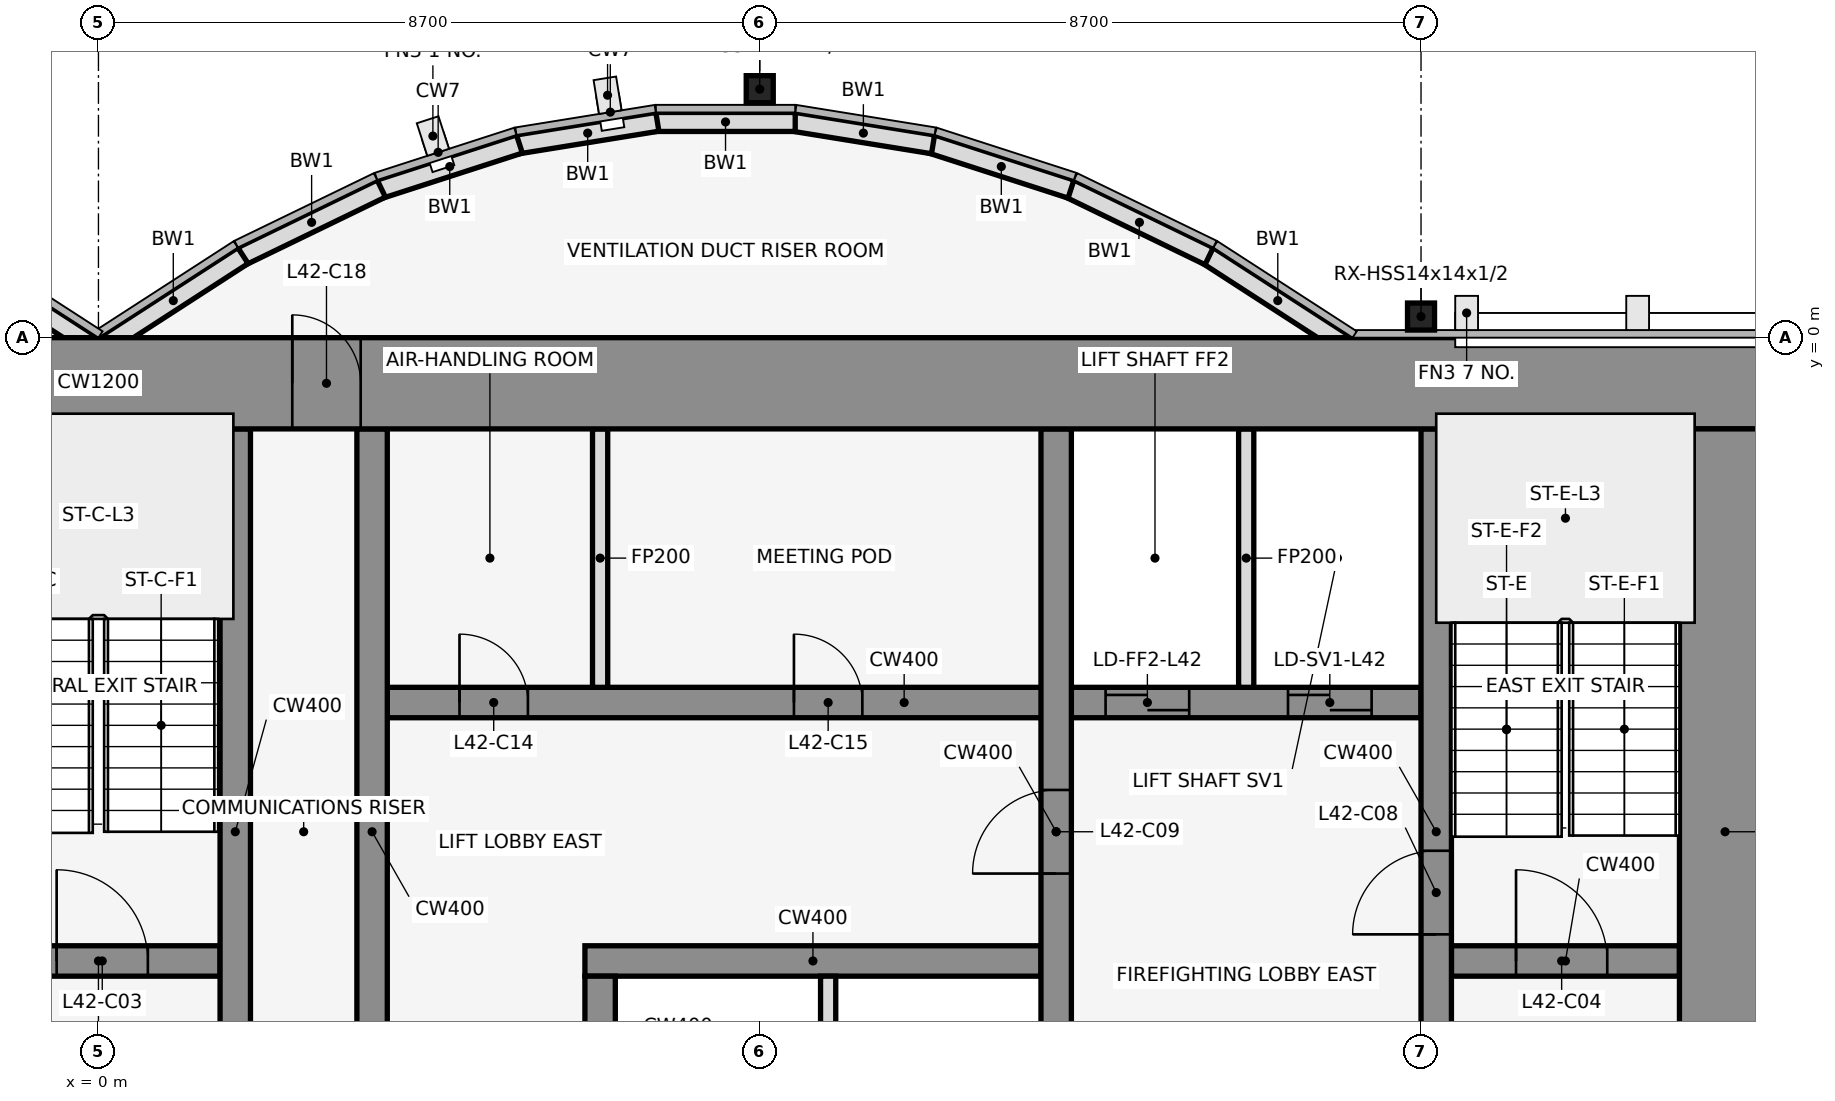
"""IFC4 building model, lengths in metres.
Left out: names, types, materials, properties, quantities, classifications, styles, units other than length and angle.
Written with IfcOpenShell. Run it as: python <this file> out.ifc"""

import sys

from ifc_helpers import new_model, si_unit, direction, frame, frame_2d, origin, origin_2d, place, context, subcontext, project, spatial, rectangle, hollow_rectangle, extrude, element, fill, save


model = new_model("IFC4")
c1 = context("Model", 3, precision=1e-05, world=origin(), true_north=direction((0.0, 1.0)))
c2 = subcontext(c1, "Body", "Model", "MODEL_VIEW")
j1 = project(units=[si_unit("LENGTHUNIT", "METRE"), si_unit("PLANEANGLEUNIT", "RADIAN")], contexts=[c1])
p1 = place(None, origin())
s1 = spatial("IfcSite", under=j1, at=p1, CompositionType="ELEMENT")
p2 = place(p1, origin())
s2 = spatial("IfcBuilding", under=s1, at=p2, CompositionType="ELEMENT")
p3 = place(p2, frame((0.0, 0.0, 190.9)))
s3 = spatial("IfcBuildingStorey", under=s2, at=p3, CompositionType="ELEMENT", Elevation=190.9)
for number, where, z_axis, x_axis in (
    (1, (8.7, 3.269, 0.0), (0.0, 0.0, 1.0), (1.0, 0.0, 0.0)),
    (2, (17.4, 0.278, 0.0), (0.0, 0.0, 1.0), (1.0, 0.0, 0.0)),
):
    element("IfcColumn", number, at=place(p3, frame(where, z_axis=z_axis, x_axis=x_axis)), inside=s3, PredefinedType="COLUMN", context=c2, shape_type="SweptSolid", body=[
        extrude(hollow_rectangle(XDim=0.356, YDim=0.356, WallThickness=0.012, at=origin_2d()), origin(), (0.0, 0.0, 1.0), 4.1),
    ])
p4 = place(p3, frame((16.432, -0.105, 0.0), z_axis=(0.0, 0.0, 1.0), x_axis=(-0.83981312244, 0.542875602121, 0.0)))
e3 = element("IfcWall", 3, at=p4, inside=s3, PredefinedType="STANDARD", context=c2, shape_type="SweptSolid", body=[
    extrude(rectangle(XDim=2.183, YDim=0.25, at=frame_2d((1.091, 0.0))), origin(), (0.0, 0.0, 1.0), 3.95),
])
p5 = place(p3, frame((14.612, 1.073, 0.0), z_axis=(0.0, 0.0, 1.0), x_axis=(-0.89982408427, 0.436252928206, 0.0)))
e4 = element("IfcWall", 4, at=p5, inside=s3, PredefinedType="STANDARD", context=c2, shape_type="SweptSolid", body=[
    extrude(rectangle(XDim=2.038, YDim=0.25, at=frame_2d((1.019, 0.0))), origin(), (0.0, 0.0, 1.0), 3.95),
])
p6 = place(p3, frame((12.795, 1.955, 0.0), z_axis=(0.0, 0.0, 1.0), x_axis=(-0.951495806175, 0.307661714928, 0.0)))
e5 = element("IfcWall", 5, at=p6, inside=s3, PredefinedType="STANDARD", context=c2, shape_type="SweptSolid", body=[
    extrude(rectangle(XDim=1.927, YDim=0.25, at=frame_2d((0.963, 0.0))), origin(), (0.0, 0.0, 1.0), 3.95),
])
p7 = place(p3, frame((10.98, 2.543, 0.0), z_axis=(0.0, 0.0, 1.0), x_axis=(-0.987181718931, 0.159600293885, 0.0)))
e6 = element("IfcWall", 6, at=p7, inside=s3, PredefinedType="STANDARD", context=c2, shape_type="SweptSolid", body=[
    extrude(rectangle(XDim=1.857, YDim=0.25, at=frame_2d((0.929, 0.0))), origin(), (0.0, 0.0, 1.0), 3.95),
])
p8 = place(p3, frame((9.167, 2.838, 0.0), z_axis=(0.0, 0.0, 1.0), x_axis=(-1.0, 0.0, 0.0)))
e7 = element("IfcWall", 7, at=p8, inside=s3, PredefinedType="STANDARD", context=c2, shape_type="SweptSolid", body=[
    extrude(rectangle(XDim=1.833, YDim=0.25, at=frame_2d((0.917, 0.0))), origin(), (0.0, 0.0, 1.0), 3.95),
])
p9 = place(p3, frame((7.353, 2.84, 0.0), z_axis=(0.0, 0.0, 1.0), x_axis=(-0.987181718931, -0.159600293885, 0.0)))
e8 = element("IfcWall", 8, at=p9, inside=s3, PredefinedType="STANDARD", context=c2, shape_type="SweptSolid", body=[
    extrude(rectangle(XDim=1.857, YDim=0.25, at=frame_2d((0.929, 0.0))), origin(), (0.0, 0.0, 1.0), 3.95),
])
p10 = place(p3, frame((5.538, 2.548, 0.0), z_axis=(0.0, 0.0, 1.0), x_axis=(-0.951495806175, -0.307661714928, 0.0)))
e9 = element("IfcWall", 9, at=p10, inside=s3, PredefinedType="STANDARD", context=c2, shape_type="SweptSolid", body=[
    extrude(rectangle(XDim=1.927, YDim=0.25, at=frame_2d((0.963, 0.0))), origin(), (0.0, 0.0, 1.0), 3.95),
])
p11 = place(p3, frame((3.721, 1.962, 0.0), z_axis=(0.0, 0.0, 1.0), x_axis=(-0.89982408427, -0.436252928206, 0.0)))
e10 = element("IfcWall", 10, at=p11, inside=s3, PredefinedType="STANDARD", context=c2, shape_type="SweptSolid", body=[
    extrude(rectangle(XDim=2.038, YDim=0.25, at=frame_2d((1.019, 0.0))), origin(), (0.0, 0.0, 1.0), 3.95),
])
for number, where, z_axis, x_axis in (
    (11, (1.901, 1.08, 0.0), (0.0, 0.0, 1.0), (-0.84, -0.543, 0.0)),
    (12, (-0.068, -0.105, 0.0), (0.0, 0.0, 1.0), (-0.84, 0.543, 0.0)),
):
    element("IfcWall", number, at=place(p3, frame(where, z_axis=z_axis, x_axis=x_axis)), inside=s3, PredefinedType="STANDARD", context=c2, shape_type="SweptSolid", body=[
        extrude(rectangle(XDim=2.183, YDim=0.25, at=frame_2d((1.091, 0.0))), origin(), (0.0, 0.0, 1.0), 3.95),
    ])
p12 = place(p3, frame((-1.6, -8.2, 0.0), z_axis=(0.0, 0.0, 1.0), x_axis=(1.0, 0.0, 0.0)))
e13 = element("IfcWall", 13, at=p12, inside=s3, PredefinedType="SHEAR", context=c2, shape_type="SweptSolid", body=[
    extrude(rectangle(XDim=3.2, YDim=0.4, at=frame_2d((1.6, 0.0))), origin(), (0.0, 0.0, 1.0), 4.1),
])
p13 = place(p12, frame((1.05, 0.0, 0.0)))
e14 = element("IfcOpeningElement", 14, at=p13, cuts=e13, PredefinedType="OPENING", context=c2, shape_type="SweptSolid", body=[
    extrude(rectangle(XDim=1.2, YDim=2.1, at=frame_2d((0.6, 1.05))), frame((0.0, 0.212, 0.0), z_axis=(0.0, -1.0, 0.0), x_axis=(1.0, 0.0, 0.0)), (0.0, 0.0, 1.0), 0.424),
])
p14 = place(p3, frame((6.4, -8.2, 0.0), z_axis=(0.0, 0.0, 1.0), x_axis=(1.0, 0.0, 0.0)))
e15 = element("IfcWall", 15, at=p14, inside=s3, PredefinedType="SHEAR", context=c2, shape_type="SweptSolid", body=[
    extrude(rectangle(XDim=6.0, YDim=0.4, at=frame_2d((3.0, 0.0))), origin(), (0.0, 0.0, 1.0), 4.1),
])
p15 = place(p3, frame((17.8, -8.2, 0.0), z_axis=(0.0, 0.0, 1.0), x_axis=(1.0, 0.0, 0.0)))
e16 = element("IfcWall", 16, at=p15, inside=s3, PredefinedType="SHEAR", context=c2, shape_type="SweptSolid", body=[
    extrude(rectangle(XDim=3.0, YDim=0.4, at=frame_2d((1.5, 0.0))), origin(), (0.0, 0.0, 1.0), 4.1),
])
p16 = place(p15, frame((0.85, 0.0, 0.0)))
e17 = element("IfcOpeningElement", 17, at=p16, cuts=e16, PredefinedType="OPENING", context=c2, shape_type="SweptSolid", body=[
    extrude(rectangle(XDim=1.2, YDim=2.1, at=frame_2d((0.6, 1.05))), frame((0.0, 0.212, 0.0), z_axis=(0.0, -1.0, 0.0), x_axis=(1.0, 0.0, 0.0)), (0.0, 0.0, 1.0), 0.424),
])
p17 = place(p3, frame((3.8, -4.8, 0.0), z_axis=(0.0, 0.0, 1.0), x_axis=(1.0, 0.0, 0.0)))
e18 = element("IfcWall", 18, at=p17, inside=s3, PredefinedType="SHEAR", context=c2, shape_type="SweptSolid", body=[
    extrude(rectangle(XDim=13.6, YDim=0.4, at=frame_2d((6.8, 0.0))), origin(), (0.0, 0.0, 1.0), 4.1),
])
p18 = place(p17, frame((9.45, 0.0, 0.0)))
e19 = element("IfcOpeningElement", 19, at=p18, cuts=e18, PredefinedType="OPENING", context=c2, shape_type="SweptSolid", body=[
    extrude(rectangle(XDim=1.1, YDim=2.1, at=frame_2d((0.55, 1.05))), frame((0.0, 0.212, 0.0), z_axis=(0.0, -1.0, 0.0), x_axis=(1.0, 0.0, 0.0)), (0.0, 0.0, 1.0), 0.424),
])
p19 = place(p17, frame((11.85, 0.0, 0.0)))
e20 = element("IfcOpeningElement", 20, at=p19, cuts=e18, PredefinedType="OPENING", context=c2, shape_type="SweptSolid", body=[
    extrude(rectangle(XDim=1.1, YDim=2.1, at=frame_2d((0.55, 1.05))), frame((0.0, 0.212, 0.0), z_axis=(0.0, -1.0, 0.0), x_axis=(1.0, 0.0, 0.0)), (0.0, 0.0, 1.0), 0.424),
])
p20 = place(p17, frame((0.95, 0.0, 0.0)))
e21 = element("IfcOpeningElement", 21, at=p20, cuts=e18, PredefinedType="OPENING", context=c2, shape_type="SweptSolid", body=[
    extrude(rectangle(XDim=0.9, YDim=2.1, at=frame_2d((0.45, 1.05))), frame((0.0, 0.212, 0.0), z_axis=(0.0, -1.0, 0.0), x_axis=(1.0, 0.0, 0.0)), (0.0, 0.0, 1.0), 0.424),
])
p21 = place(p17, frame((5.35, 0.0, 0.0)))
e22 = element("IfcOpeningElement", 22, at=p21, cuts=e18, PredefinedType="OPENING", context=c2, shape_type="SweptSolid", body=[
    extrude(rectangle(XDim=0.9, YDim=2.1, at=frame_2d((0.45, 1.05))), frame((0.0, 0.212, 0.0), z_axis=(0.0, -1.0, 0.0), x_axis=(1.0, 0.0, 0.0)), (0.0, 0.0, 1.0), 0.424),
])
p22 = place(p3, frame((1.8, -11.8, 0.0), z_axis=(0.0, 0.0, 1.0), x_axis=(0.0, 1.0, 0.0)))
e23 = element("IfcWall", 23, at=p22, inside=s3, PredefinedType="SHEAR", context=c2, shape_type="SweptSolid", body=[
    extrude(rectangle(XDim=10.6, YDim=0.4, at=frame_2d((5.3, 0.0))), origin(), (0.0, 0.0, 1.0), 4.1),
])
p23 = place(p3, frame((3.6, -11.8, 0.0), z_axis=(0.0, 0.0, 1.0), x_axis=(0.0, 1.0, 0.0)))
e24 = element("IfcWall", 24, at=p23, inside=s3, PredefinedType="SHEAR", context=c2, shape_type="SweptSolid", body=[
    extrude(rectangle(XDim=10.6, YDim=0.4, at=frame_2d((5.3, 0.0))), origin(), (0.0, 0.0, 1.0), 4.1),
])
p24 = place(p23, frame((1.35, 0.0, 0.0)))
e25 = element("IfcOpeningElement", 25, at=p24, cuts=e24, PredefinedType="OPENING", context=c2, shape_type="SweptSolid", body=[
    extrude(rectangle(XDim=0.9, YDim=2.1, at=frame_2d((0.45, 1.05))), frame((0.0, 0.212, 0.0), z_axis=(0.0, -1.0, 0.0), x_axis=(1.0, 0.0, 0.0)), (0.0, 0.0, 1.0), 0.424),
])
p25 = place(p3, frame((6.6, -11.8, 0.0), z_axis=(0.0, 0.0, 1.0), x_axis=(0.0, 1.0, 0.0)))
e26 = element("IfcWall", 26, at=p25, inside=s3, PredefinedType="SHEAR", context=c2, shape_type="SweptSolid", body=[
    extrude(rectangle(XDim=3.4, YDim=0.4, at=frame_2d((1.7, 0.0))), origin(), (0.0, 0.0, 1.0), 4.1),
])
for number, where, z_axis, x_axis in (
    (27, (6.6, -4.6, 0.0), (0.0, 0.0, 1.0), (0.0, 1.0, 0.0)),
    (28, (9.6, -11.8, 0.0), (0.0, 0.0, 1.0), (0.0, 1.0, 0.0)),
):
    element("IfcWall", number, at=place(p3, frame(where, z_axis=z_axis, x_axis=x_axis)), inside=s3, PredefinedType="PARTITIONING", context=c2, shape_type="SweptSolid", body=[
        extrude(rectangle(XDim=3.4, YDim=0.2, at=frame_2d((1.7, 0.0))), origin(), (0.0, 0.0, 1.0), 2.96),
    ])
p26 = place(p3, frame((12.6, -11.8, 0.0), z_axis=(0.0, 0.0, 1.0), x_axis=(0.0, 1.0, 0.0)))
e29 = element("IfcWall", 29, at=p26, inside=s3, PredefinedType="SHEAR", context=c2, shape_type="SweptSolid", body=[
    extrude(rectangle(XDim=10.6, YDim=0.4, at=frame_2d((5.3, 0.0))), origin(), (0.0, 0.0, 1.0), 4.1),
])
p27 = place(p26, frame((1.25, 0.0, 0.0)))
e30 = element("IfcOpeningElement", 30, at=p27, cuts=e29, PredefinedType="OPENING", context=c2, shape_type="SweptSolid", body=[
    extrude(rectangle(XDim=1.2, YDim=2.1, at=frame_2d((0.6, 1.05))), frame((0.0, 0.212, 0.0), z_axis=(0.0, -1.0, 0.0), x_axis=(1.0, 0.0, 0.0)), (0.0, 0.0, 1.0), 0.424),
])
p28 = place(p26, frame((4.75, 0.0, 0.0)))
e31 = element("IfcOpeningElement", 31, at=p28, cuts=e29, PredefinedType="OPENING", context=c2, shape_type="SweptSolid", body=[
    extrude(rectangle(XDim=1.1, YDim=2.1, at=frame_2d((0.55, 1.05))), frame((0.0, 0.212, 0.0), z_axis=(0.0, -1.0, 0.0), x_axis=(1.0, 0.0, 0.0)), (0.0, 0.0, 1.0), 0.424),
])
p29 = place(p3, frame((15.1, -4.6, 0.0), z_axis=(0.0, 0.0, 1.0), x_axis=(0.0, 1.0, 0.0)))
e32 = element("IfcWall", 32, at=p29, inside=s3, PredefinedType="PARTITIONING", context=c2, shape_type="SweptSolid", body=[
    extrude(rectangle(XDim=3.4, YDim=0.2, at=frame_2d((1.7, 0.0))), origin(), (0.0, 0.0, 1.0), 2.96),
])
p30 = place(p3, frame((17.6, -11.8, 0.0), z_axis=(0.0, 0.0, 1.0), x_axis=(0.0, 1.0, 0.0)))
e33 = element("IfcWall", 33, at=p30, inside=s3, PredefinedType="SHEAR", context=c2, shape_type="SweptSolid", body=[
    extrude(rectangle(XDim=10.6, YDim=0.4, at=frame_2d((5.3, 0.0))), origin(), (0.0, 0.0, 1.0), 4.1),
])
p31 = place(p30, frame((1.25, 0.0, 0.0)))
e34 = element("IfcOpeningElement", 34, at=p31, cuts=e33, PredefinedType="OPENING", context=c2, shape_type="SweptSolid", body=[
    extrude(rectangle(XDim=1.1, YDim=2.1, at=frame_2d((0.55, 1.05))), frame((0.0, 0.212, 0.0), z_axis=(0.0, -1.0, 0.0), x_axis=(1.0, 0.0, 0.0)), (0.0, 0.0, 1.0), 0.424),
])
p32 = place(p30, frame((3.95, 0.0, 0.0)))
e35 = element("IfcOpeningElement", 35, at=p32, cuts=e33, PredefinedType="OPENING", context=c2, shape_type="SweptSolid", body=[
    extrude(rectangle(XDim=1.1, YDim=2.1, at=frame_2d((0.55, 1.05))), frame((0.0, 0.212, 0.0), z_axis=(0.0, -1.0, 0.0), x_axis=(1.0, 0.0, 0.0)), (0.0, 0.0, 1.0), 0.424),
])
p33 = place(p3, frame((-22.0, -0.6, 0.0), z_axis=(0.0, 0.0, 1.0), x_axis=(1.0, 0.0, 0.0)))
e36 = element("IfcWall", 36, at=p33, inside=s3, PredefinedType="SHEAR", context=c2, shape_type="SweptSolid", body=[
    extrude(rectangle(XDim=44.0, YDim=1.2, at=frame_2d((22.0, 0.0))), origin(), (0.0, 0.0, 1.0), 4.1),
])
p34 = place(p33, frame((18.55, 0.0, 0.0)))
e37 = element("IfcOpeningElement", 37, at=p34, cuts=e36, PredefinedType="OPENING", context=c2, shape_type="SweptSolid", body=[
    extrude(rectangle(XDim=0.9, YDim=2.1, at=frame_2d((0.45, 1.05))), frame((0.0, 0.612, 0.0), z_axis=(0.0, -1.0, 0.0), x_axis=(1.0, 0.0, 0.0)), (0.0, 0.0, 1.0), 1.224),
])
p35 = place(p33, frame((24.55, 0.0, 0.0)))
e38 = element("IfcOpeningElement", 38, at=p35, cuts=e36, PredefinedType="OPENING", context=c2, shape_type="SweptSolid", body=[
    extrude(rectangle(XDim=0.9, YDim=2.1, at=frame_2d((0.45, 1.05))), frame((0.0, 0.612, 0.0), z_axis=(0.0, -1.0, 0.0), x_axis=(1.0, 0.0, 0.0)), (0.0, 0.0, 1.0), 1.224),
])
p36 = place(p3, frame((21.4, -11.8, 0.0), z_axis=(0.0, 0.0, 1.0), x_axis=(0.0, 1.0, 0.0)))
e39 = element("IfcWall", 39, at=p36, inside=s3, PredefinedType="SHEAR", context=c2, shape_type="SweptSolid", body=[
    extrude(rectangle(XDim=10.6, YDim=1.2, at=frame_2d((5.3, 0.0))), origin(), (0.0, 0.0, 1.0), 4.1),
])
p37 = place(p13, origin())
e40 = element("IfcDoor", 40, at=p37, inside=s3, OperationType="SINGLE_SWING_LEFT", PredefinedType="DOOR", context=c2, shape_type="SweptSolid", body=[
    extrude(rectangle(XDim=1.2, YDim=2.1, at=frame_2d((0.6, 1.05))), frame((0.0, 0.025, 0.0), z_axis=(0.0, -1.0, 0.0), x_axis=(1.0, 0.0, 0.0)), (0.0, 0.0, 1.0), 0.05),
])
fill(e14, e40)
p38 = place(p16, origin())
e41 = element("IfcDoor", 41, at=p38, inside=s3, OperationType="SINGLE_SWING_RIGHT", PredefinedType="DOOR", context=c2, shape_type="SweptSolid", body=[
    extrude(rectangle(XDim=1.2, YDim=2.1, at=frame_2d((0.6, 1.05))), frame((0.0, 0.025, 0.0), z_axis=(0.0, -1.0, 0.0), x_axis=(1.0, 0.0, 0.0)), (0.0, 0.0, 1.0), 0.05),
])
fill(e17, e41)
p39 = place(p18, origin())
e42 = element("IfcDoor", 42, at=p39, inside=s3, OperationType="DOUBLE_DOOR_SLIDING", PredefinedType="DOOR", context=c2, shape_type="SweptSolid", body=[
    extrude(rectangle(XDim=1.1, YDim=2.1, at=frame_2d((0.55, 1.05))), frame((0.0, 0.025, 0.0), z_axis=(0.0, -1.0, 0.0), x_axis=(1.0, 0.0, 0.0)), (0.0, 0.0, 1.0), 0.05),
])
fill(e19, e42)
p40 = place(p19, origin())
e43 = element("IfcDoor", 43, at=p40, inside=s3, OperationType="DOUBLE_DOOR_SLIDING", PredefinedType="DOOR", context=c2, shape_type="SweptSolid", body=[
    extrude(rectangle(XDim=1.1, YDim=2.1, at=frame_2d((0.55, 1.05))), frame((0.0, 0.025, 0.0), z_axis=(0.0, -1.0, 0.0), x_axis=(1.0, 0.0, 0.0)), (0.0, 0.0, 1.0), 0.05),
])
fill(e20, e43)
p41 = place(p32, origin())
e44 = element("IfcDoor", 44, at=p41, inside=s3, OperationType="SINGLE_SWING_RIGHT", PredefinedType="DOOR", context=c2, shape_type="SweptSolid", body=[
    extrude(rectangle(XDim=1.1, YDim=2.1, at=frame_2d((0.55, 1.05))), frame((0.0, 0.025, 0.0), z_axis=(0.0, -1.0, 0.0), x_axis=(1.0, 0.0, 0.0)), (0.0, 0.0, 1.0), 0.05),
])
fill(e35, e44)
p42 = place(p28, frame((1.1, 0.0, 0.0), z_axis=(0.0, 0.0, 1.0), x_axis=(-1.0, 0.0, 0.0)))
e45 = element("IfcDoor", 45, at=p42, inside=s3, OperationType="SINGLE_SWING_RIGHT", PredefinedType="DOOR", context=c2, shape_type="SweptSolid", body=[
    extrude(rectangle(XDim=1.1, YDim=2.1, at=frame_2d((0.55, 1.05))), frame((0.0, 0.025, 0.0), z_axis=(0.0, -1.0, 0.0), x_axis=(1.0, 0.0, 0.0)), (0.0, 0.0, 1.0), 0.05),
])
fill(e31, e45)
p43 = place(p20, origin())
e46 = element("IfcDoor", 46, at=p43, inside=s3, OperationType="SINGLE_SWING_RIGHT", PredefinedType="DOOR", context=c2, shape_type="SweptSolid", body=[
    extrude(rectangle(XDim=0.9, YDim=2.1, at=frame_2d((0.45, 1.05))), frame((0.0, 0.025, 0.0), z_axis=(0.0, -1.0, 0.0), x_axis=(1.0, 0.0, 0.0)), (0.0, 0.0, 1.0), 0.05),
])
fill(e21, e46)
p44 = place(p21, origin())
e47 = element("IfcDoor", 47, at=p44, inside=s3, OperationType="SINGLE_SWING_LEFT", PredefinedType="DOOR", context=c2, shape_type="SweptSolid", body=[
    extrude(rectangle(XDim=0.9, YDim=2.1, at=frame_2d((0.45, 1.05))), frame((0.0, 0.025, 0.0), z_axis=(0.0, -1.0, 0.0), x_axis=(1.0, 0.0, 0.0)), (0.0, 0.0, 1.0), 0.05),
])
fill(e22, e47)
p45 = place(p35, origin())
e48 = element("IfcDoor", 48, at=p45, inside=s3, OperationType="SINGLE_SWING_LEFT", PredefinedType="DOOR", context=c2, shape_type="SweptSolid", body=[
    extrude(rectangle(XDim=0.9, YDim=2.1, at=frame_2d((0.45, 1.05))), frame((0.0, 0.025, 0.0), z_axis=(0.0, -1.0, 0.0), x_axis=(1.0, 0.0, 0.0)), (0.0, 0.0, 1.0), 0.05),
])
fill(e38, e48)
save(model, sys.argv[1])
